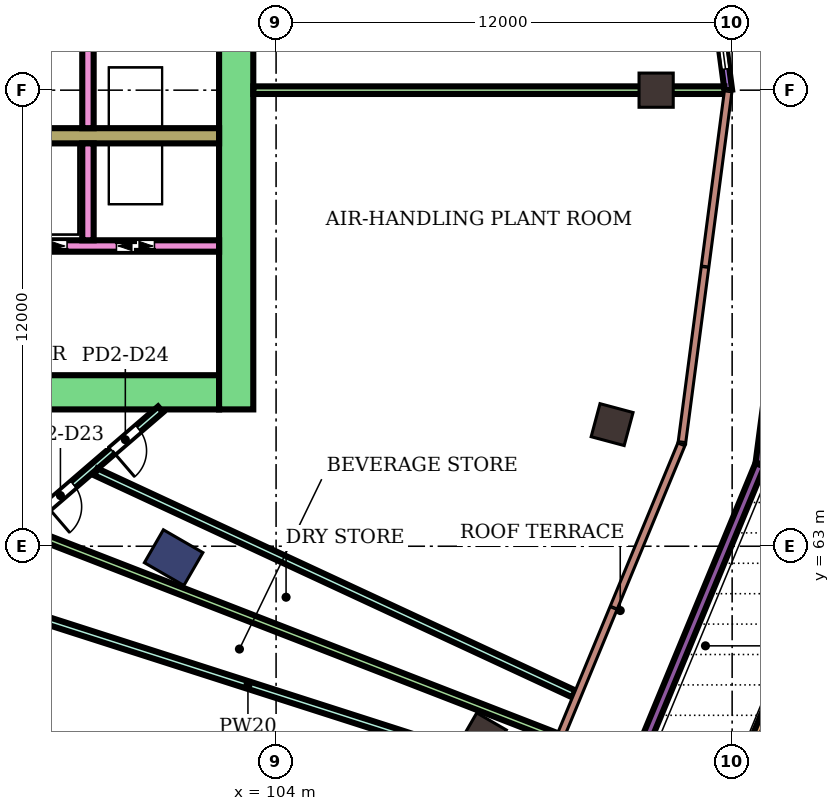
"""IFC4 building model, lengths in metres.
Left out: names, types, materials, properties, quantities, classifications, styles, units other than length and angle.
Written with IfcOpenShell. Run it as: python <this file> out.ifc"""

import sys

from ifc_helpers import new_model, si_unit, direction, frame, frame_2d, origin, origin_2d, place, context, subcontext, project, spatial, rectangle, extrude, element, fill, save


model = new_model("IFC4")
c1 = context("Model", 3, precision=1e-05, world=origin(), true_north=direction((0.0, 1.0)))
c2 = subcontext(c1, "Body", "Model", "MODEL_VIEW")
j1 = project(units=[si_unit("LENGTHUNIT", "METRE"), si_unit("PLANEANGLEUNIT", "RADIAN")], contexts=[c1])
p1 = place(None, origin())
s1 = spatial("IfcSite", under=j1, at=p1, CompositionType="ELEMENT")
p2 = place(p1, origin())
s2 = spatial("IfcBuilding", under=s1, at=p2, CompositionType="ELEMENT")
p3 = place(p2, frame((0.0, 0.0, 12.4)))
s3 = spatial("IfcBuildingStorey", under=s2, at=p3, CompositionType="ELEMENT", Elevation=12.4)
for number, where, z_axis, x_axis in (
    (1, (114.0, 75.0, 0.0), (0.0, 0.0, 1.0), (1.0, 0.0, 0.0)),
    (2, (109.445, 58.0, 0.0), (0.0, 0.0, 1.0), (0.866, -0.5, 0.0)),
    (3, (112.842, 66.2, 0.0), (0.0, 0.0, 1.0), (0.966, -0.259, 0.0)),
):
    element("IfcColumn", number, at=place(p3, frame(where, z_axis=z_axis, x_axis=x_axis)), inside=s3, PredefinedType="COLUMN", context=c2, shape_type="SweptSolid", body=[
        extrude(rectangle(XDim=0.9, YDim=0.9, at=origin_2d()), origin(), (0.0, 0.0, 1.0), 5.4),
    ])
p4 = place(p3, frame((101.304, 62.7, 0.0), z_axis=(0.0, 0.0, 1.0), x_axis=(0.866025403784, -0.5, 0.0)))
e4 = element("IfcColumn", 4, at=p4, inside=s3, PredefinedType="COLUMN", context=c2, shape_type="SweptSolid", body=[
    extrude(rectangle(XDim=1.2, YDim=1.0, at=origin_2d()), origin(), (0.0, 0.0, 1.0), 5.4),
])
p5 = place(p3, frame((87.9, 67.05, 0.0), z_axis=(0.0, 0.0, 1.0), x_axis=(1.0, 0.0, 0.0)))
e5 = element("IfcWall", 5, at=p5, inside=s3, PredefinedType="SHEAR", context=c2, shape_type="SweptSolid", body=[
    extrude(rectangle(XDim=14.6, YDim=0.9, at=frame_2d((7.3, 0.0))), origin(), (0.0, 0.0, 1.0), 4.95),
])
p6 = place(p5, frame((4.2, 0.0, 0.0)))
e6 = element("IfcOpeningElement", 6, at=p6, cuts=e5, PredefinedType="OPENING", context=c2, shape_type="SweptSolid", body=[
    extrude(rectangle(XDim=2.4, YDim=2.4, at=frame_2d((1.2, 1.2))), frame((0.0, 0.46, 0.0), z_axis=(0.0, -1.0, 0.0), x_axis=(1.0, 0.0, 0.0)), (0.0, 0.0, 1.0), 0.92),
])
p7 = place(p3, frame((102.95, 66.6, 0.0), z_axis=(0.0, 0.0, 1.0), x_axis=(0.0, 1.0, 0.0)))
e7 = element("IfcWall", 7, at=p7, inside=s3, PredefinedType="SHEAR", context=c2, shape_type="SweptSolid", body=[
    extrude(rectangle(XDim=16.8, YDim=0.9, at=frame_2d((8.4, 0.0))), origin(), (0.0, 0.0, 1.0), 4.95),
])
p8 = place(p3, frame((91.7, 73.8, 0.0), z_axis=(0.0, 0.0, 1.0), x_axis=(1.0, 0.0, 0.0)))
e8 = element("IfcWall", 8, at=p8, inside=s3, PredefinedType="SHEAR", context=c2, shape_type="SweptSolid", body=[
    extrude(rectangle(XDim=10.8, YDim=0.4, at=frame_2d((5.4, 0.0))), origin(), (0.0, 0.0, 1.0), 4.95),
])
p9 = place(p3, frame((91.7, 70.9, 0.0), z_axis=(0.0, 0.0, 1.0), x_axis=(1.0, 0.0, 0.0)))
e9 = element("IfcWall", 9, at=p9, inside=s3, PredefinedType="SHEAR", context=c2, shape_type="SweptSolid", body=[
    extrude(rectangle(XDim=10.8, YDim=0.3, at=frame_2d((5.4, 0.0))), origin(), (0.0, 0.0, 1.0), 4.95),
])
p10 = place(p9, frame((0.4, 0.0, 0.0)))
e10 = element("IfcOpeningElement", 10, at=p10, cuts=e9, PredefinedType="OPENING", context=c2, shape_type="SweptSolid", body=[
    extrude(rectangle(XDim=1.4, YDim=2.1, at=frame_2d((0.7, 1.05))), frame((0.0, 0.16, 0.0), z_axis=(0.0, -1.0, 0.0), x_axis=(1.0, 0.0, 0.0)), (0.0, 0.0, 1.0), 0.32),
])
p11 = place(p9, frame((5.4, 0.0, 0.0)))
e11 = element("IfcOpeningElement", 11, at=p11, cuts=e9, PredefinedType="OPENING", context=c2, shape_type="SweptSolid", body=[
    extrude(rectangle(XDim=1.4, YDim=2.1, at=frame_2d((0.7, 1.05))), frame((0.0, 0.16, 0.0), z_axis=(0.0, -1.0, 0.0), x_axis=(1.0, 0.0, 0.0)), (0.0, 0.0, 1.0), 0.32),
])
p12 = place(p9, frame((8.1, 0.0, 0.0)))
e12 = element("IfcOpeningElement", 12, at=p12, cuts=e9, PredefinedType="OPENING", context=c2, shape_type="SweptSolid", body=[
    extrude(rectangle(XDim=1.0, YDim=2.1, at=frame_2d((0.5, 1.05))), frame((0.0, 0.16, 0.0), z_axis=(0.0, -1.0, 0.0), x_axis=(1.0, 0.0, 0.0)), (0.0, 0.0, 1.0), 0.32),
])
for number, where, z_axis, x_axis in (
    (13, (99.05, 74.0, 0.0), (0.0, 0.0, 1.0), (0.0, 1.0, 0.0)),
    (14, (99.05, 71.05, 0.0), (0.0, 0.0, 1.0), (0.0, 1.0, 0.0)),
):
    element("IfcWall", number, at=place(p3, frame(where, z_axis=z_axis, x_axis=x_axis)), inside=s3, PredefinedType="SHEAR", context=c2, shape_type="SweptSolid", body=[
        extrude(rectangle(XDim=2.55, YDim=0.3, at=frame_2d((1.275, 0.0))), origin(), (0.0, 0.0, 1.0), 4.95),
    ])
p13 = place(p3, frame((115.899, 75.0, 0.0), z_axis=(0.0, 0.0, 1.0), x_axis=(-0.130518532918, 0.99144586971, 0.0)))
e15 = element("IfcWall", 15, at=p13, inside=s3, PredefinedType="NOTDEFINED", context=c2, shape_type="SweptSolid", body=[
    extrude(rectangle(XDim=9.371, YDim=0.2, at=frame_2d((4.686, 0.0))), origin(), (0.0, 0.0, 1.0), 5.4),
])
p14 = place(p13, frame((0.562, 0.0, 0.9)))
e16 = element("IfcOpeningElement", 16, at=p14, cuts=e15, PredefinedType="OPENING", context=c2, shape_type="SweptSolid", body=[
    extrude(rectangle(XDim=2.0, YDim=2.4, at=frame_2d((1.0, 1.2))), frame((0.0, 0.11, 0.0), z_axis=(0.0, -1.0, 0.0), x_axis=(1.0, 0.0, 0.0)), (0.0, 0.0, 1.0), 0.22),
])
p15 = place(p13, frame((3.786, 0.0, 0.0)))
e17 = element("IfcOpeningElement", 17, at=p15, cuts=e15, PredefinedType="OPENING", context=c2, shape_type="SweptSolid", body=[
    extrude(rectangle(XDim=1.8, YDim=2.4, at=frame_2d((0.9, 1.2))), frame((0.0, 0.11, 0.0), z_axis=(0.0, -1.0, 0.0), x_axis=(1.0, 0.0, 0.0)), (0.0, 0.0, 1.0), 0.22),
])
p16 = place(p13, frame((6.81, 0.0, 0.9)))
e18 = element("IfcOpeningElement", 18, at=p16, cuts=e15, PredefinedType="OPENING", context=c2, shape_type="SweptSolid", body=[
    extrude(rectangle(XDim=2.0, YDim=2.4, at=frame_2d((1.0, 1.2))), frame((0.0, 0.11, 0.0), z_axis=(0.0, -1.0, 0.0), x_axis=(1.0, 0.0, 0.0)), (0.0, 0.0, 1.0), 0.22),
])
p17 = place(p3, frame((119.306, 64.455, 0.0), z_axis=(0.0, 0.0, 1.0), x_axis=(-0.382690890544, -0.923876443197, 0.0)))
e19 = element("IfcWall", 19, at=p17, inside=s3, PredefinedType="PARAPET", context=c2, shape_type="SweptSolid", body=[
    extrude(rectangle(XDim=10.598, YDim=0.2, at=frame_2d((5.299, 0.0))), origin(), (0.0, 0.0, 1.0), 1.1),
])
p18 = place(p3, frame((116.739, 84.827, 0.0), z_axis=(0.0, 0.0, 1.0), x_axis=(0.130543713086, -0.991442554551, 0.0)))
e20 = element("IfcWall", 20, at=p18, inside=s3, PredefinedType="USERDEFINED", context=c2, shape_type="SweptSolid", body=[
    extrude(rectangle(XDim=9.912, YDim=0.25, at=frame_2d((4.956, 0.0))), origin(), (0.0, 0.0, 1.0), 0.6),
])
p19 = place(p3, frame((117.306, 69.483, 0.0), z_axis=(0.0, 0.0, 1.0), x_axis=(-0.130556191609, -0.991440911418, 0.0)))
e21 = element("IfcWall", 21, at=p19, inside=s3, PredefinedType="USERDEFINED", context=c2, shape_type="SweptSolid", body=[
    extrude(rectangle(XDim=4.348, YDim=0.25, at=frame_2d((2.174, 0.0))), origin(), (0.0, 0.0, 1.0), 0.6),
])
p20 = place(p3, frame((116.73, 65.141, 0.0), z_axis=(0.0, 0.0, 1.0), x_axis=(-0.382682268453, -0.923880014619, 0.0)))
e22 = element("IfcWall", 22, at=p20, inside=s3, PredefinedType="USERDEFINED", context=c2, shape_type="SweptSolid", body=[
    extrude(rectangle(XDim=9.896, YDim=0.25, at=frame_2d((4.948, 0.0))), origin(), (0.0, 0.0, 1.0), 0.6),
])
p21 = place(p3, frame((91.735, 63.265, 0.0), z_axis=(0.0, 0.0, 1.0), x_axis=(0.707106781187, -0.707106781187, 0.0)))
e23 = element("IfcWall", 23, at=p21, inside=s3, PredefinedType="PARTITIONING", context=c2, shape_type="SweptSolid", body=[
    extrude(rectangle(XDim=19.203, YDim=0.2, at=frame_2d((9.602, 0.0))), origin(), (0.0, 0.0, 1.0), 3.75),
])
p22 = place(p3, frame((94.293, 60.863, 0.0), z_axis=(0.0, 0.0, 1.0), x_axis=(0.757971612666, 0.652287539658, 0.0)))
e24 = element("IfcWall", 24, at=p22, inside=s3, PredefinedType="PARTITIONING", context=c2, shape_type="SweptSolid", body=[
    extrude(rectangle(XDim=8.794, YDim=0.2, at=frame_2d((4.397, 0.0))), origin(), (0.0, 0.0, 1.0), 4.95),
])
p23 = place(p22, frame((0.267, 0.0, 0.0)))
e25 = element("IfcOpeningElement", 25, at=p23, cuts=e24, PredefinedType="OPENING", context=c2, shape_type="SweptSolid", body=[
    extrude(rectangle(XDim=0.9, YDim=2.1, at=frame_2d((0.45, 1.05))), frame((0.0, 0.11, 0.0), z_axis=(0.0, -1.0, 0.0), x_axis=(1.0, 0.0, 0.0)), (0.0, 0.0, 1.0), 0.22),
])
p24 = place(p22, frame((2.446, 0.0, 0.0)))
e26 = element("IfcOpeningElement", 26, at=p24, cuts=e24, PredefinedType="OPENING", context=c2, shape_type="SweptSolid", body=[
    extrude(rectangle(XDim=0.9, YDim=2.1, at=frame_2d((0.45, 1.05))), frame((0.0, 0.11, 0.0), z_axis=(0.0, -1.0, 0.0), x_axis=(1.0, 0.0, 0.0)), (0.0, 0.0, 1.0), 0.22),
])
p25 = place(p22, frame((4.87, 0.0, 0.0)))
e27 = element("IfcOpeningElement", 27, at=p25, cuts=e24, PredefinedType="OPENING", context=c2, shape_type="SweptSolid", body=[
    extrude(rectangle(XDim=0.9, YDim=2.1, at=frame_2d((0.45, 1.05))), frame((0.0, 0.11, 0.0), z_axis=(0.0, -1.0, 0.0), x_axis=(1.0, 0.0, 0.0)), (0.0, 0.0, 1.0), 0.22),
])
p26 = place(p22, frame((7.123, 0.0, 0.0)))
e28 = element("IfcOpeningElement", 28, at=p26, cuts=e24, PredefinedType="OPENING", context=c2, shape_type="SweptSolid", body=[
    extrude(rectangle(XDim=0.9, YDim=2.1, at=frame_2d((0.45, 1.05))), frame((0.0, 0.11, 0.0), z_axis=(0.0, -1.0, 0.0), x_axis=(1.0, 0.0, 0.0)), (0.0, 0.0, 1.0), 0.22),
])
p27 = place(p3, frame((95.608, 61.803, 0.0), z_axis=(0.0, 0.0, 1.0), x_axis=(0.95221773396, -0.305420017569, 0.0)))
e29 = element("IfcWall", 29, at=p27, inside=s3, PredefinedType="PARTITIONING", context=c2, shape_type="SweptSolid", body=[
    extrude(rectangle(XDim=16.071, YDim=0.2, at=frame_2d((8.036, 0.0))), origin(), (0.0, 0.0, 1.0), 4.95),
])
p28 = place(p3, frame((97.449, 63.393, 0.0), z_axis=(0.0, 0.0, 1.0), x_axis=(0.932246545469, -0.361823684218, 0.0)))
e30 = element("IfcWall", 30, at=p28, inside=s3, PredefinedType="PARTITIONING", context=c2, shape_type="SweptSolid", body=[
    extrude(rectangle(XDim=14.933, YDim=0.2, at=frame_2d((7.466, 0.0))), origin(), (0.0, 0.0, 1.0), 3.75),
])
p29 = place(p3, frame((99.258, 64.956, 0.0), z_axis=(0.0, 0.0, 1.0), x_axis=(0.906926097288, -0.421289750715, 0.0)))
e31 = element("IfcWall", 31, at=p29, inside=s3, PredefinedType="PARTITIONING", context=c2, shape_type="SweptSolid", body=[
    extrude(rectangle(XDim=13.868, YDim=0.2, at=frame_2d((6.934, 0.0))), origin(), (0.0, 0.0, 1.0), 4.95),
])
p30 = place(p3, frame((103.402, 75.0, 0.0), z_axis=(0.0, 0.0, 1.0), x_axis=(1.0, 0.0, 0.0)))
e32 = element("IfcWall", 32, at=p30, inside=s3, PredefinedType="PARTITIONING", context=c2, shape_type="SweptSolid", body=[
    extrude(rectangle(XDim=12.394, YDim=0.2, at=frame_2d((6.197, 0.0))), origin(), (0.0, 0.0, 1.0), 3.75),
])
p31 = place(p14, origin())
e33 = element("IfcWindow", 33, at=p31, inside=s3, PartitioningType="SINGLE_PANEL", PredefinedType="WINDOW", context=c2, shape_type="SweptSolid", body=[
    extrude(rectangle(XDim=2.0, YDim=2.4, at=frame_2d((1.0, 1.2))), frame((0.0, 0.03, 0.0), z_axis=(0.0, -1.0, 0.0), x_axis=(1.0, 0.0, 0.0)), (0.0, 0.0, 1.0), 0.06),
])
fill(e16, e33)
p32 = place(p25, frame((0.9, 0.0, 0.0), z_axis=(0.0, 0.0, 1.0), x_axis=(-1.0, 0.0, 0.0)))
e34 = element("IfcDoor", 34, at=p32, inside=s3, OperationType="SINGLE_SWING_RIGHT", PredefinedType="DOOR", context=c2, shape_type="SweptSolid", body=[
    extrude(rectangle(XDim=0.9, YDim=2.1, at=frame_2d((0.45, 1.05))), frame((0.0, 0.025, 0.0), z_axis=(0.0, -1.0, 0.0), x_axis=(1.0, 0.0, 0.0)), (0.0, 0.0, 1.0), 0.05),
])
fill(e27, e34)
p33 = place(p26, frame((0.9, 0.0, 0.0), z_axis=(0.0, 0.0, 1.0), x_axis=(-1.0, 0.0, 0.0)))
e35 = element("IfcDoor", 35, at=p33, inside=s3, OperationType="SINGLE_SWING_RIGHT", PredefinedType="DOOR", context=c2, shape_type="SweptSolid", body=[
    extrude(rectangle(XDim=0.9, YDim=2.1, at=frame_2d((0.45, 1.05))), frame((0.0, 0.025, 0.0), z_axis=(0.0, -1.0, 0.0), x_axis=(1.0, 0.0, 0.0)), (0.0, 0.0, 1.0), 0.05),
])
fill(e28, e35)
p34 = place(p11, origin())
e36 = element("IfcDoor", 36, at=p34, inside=s3, OperationType="DOUBLE_DOOR_SLIDING", PredefinedType="DOOR", context=c2, shape_type="SweptSolid", body=[
    extrude(rectangle(XDim=1.4, YDim=2.1, at=frame_2d((0.7, 1.05))), frame((0.0, 0.025, 0.0), z_axis=(0.0, -1.0, 0.0), x_axis=(1.0, 0.0, 0.0)), (0.0, 0.0, 1.0), 0.05),
])
fill(e11, e36)
p35 = place(p12, origin())
e37 = element("IfcDoor", 37, at=p35, inside=s3, OperationType="DOUBLE_DOOR_SLIDING", PredefinedType="DOOR", context=c2, shape_type="SweptSolid", body=[
    extrude(rectangle(XDim=1.0, YDim=2.1, at=frame_2d((0.5, 1.05))), frame((0.0, 0.025, 0.0), z_axis=(0.0, -1.0, 0.0), x_axis=(1.0, 0.0, 0.0)), (0.0, 0.0, 1.0), 0.05),
])
fill(e12, e37)
save(model, sys.argv[1])
